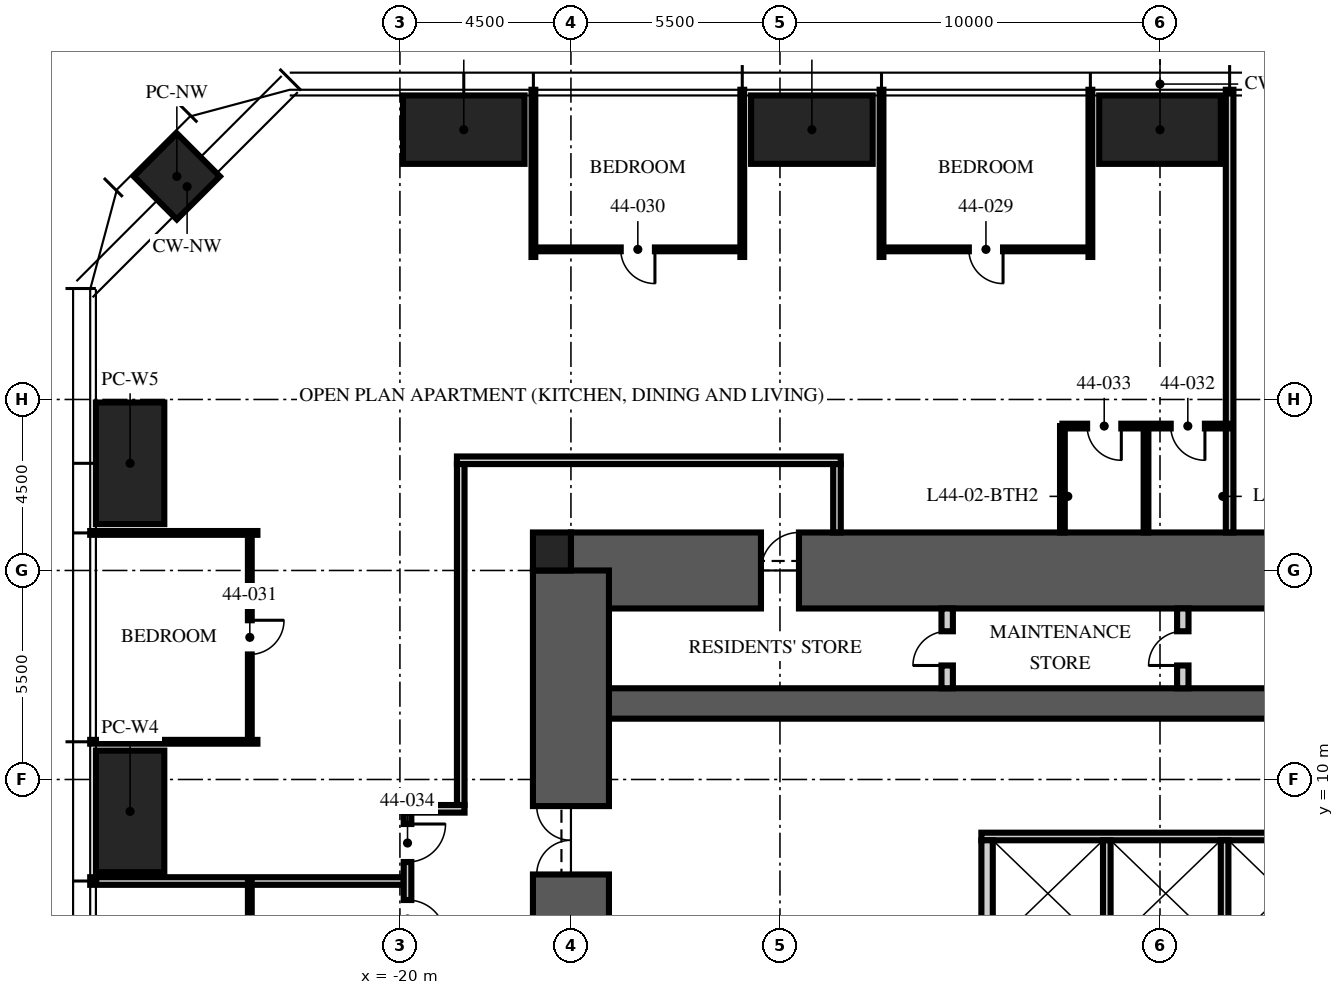
"""IFC4 building model, lengths in metres.
Left out: names, types, materials, properties, quantities, classifications, styles, units other than length and angle.
Written with IfcOpenShell. Run it as: python <this file> out.ifc"""

import sys

from ifc_helpers import new_model, si_unit, direction, frame, frame_2d, origin, origin_2d, place, context, subcontext, project, spatial, rectangle, hollow_rectangle, extrude, element, fill, save


model = new_model("IFC4")
c1 = context("Model", 3, precision=1e-05, world=origin(), true_north=direction((0.0, 1.0)))
c2 = subcontext(c1, "Body", "Model", "MODEL_VIEW")
j1 = project(units=[si_unit("LENGTHUNIT", "METRE"), si_unit("PLANEANGLEUNIT", "RADIAN")], contexts=[c1])
p1 = place(None, origin())
s1 = spatial("IfcSite", under=j1, at=p1, CompositionType="ELEMENT")
p2 = place(p1, origin())
s2 = spatial("IfcBuilding", under=s1, at=p2, CompositionType="ELEMENT")
p3 = place(p2, frame((0.0, 0.0, 174.75)))
s3 = spatial("IfcBuildingStorey", under=s2, at=p3, CompositionType="ELEMENT", Elevation=174.75)
p4 = place(p3, frame((-15.5, 15.5, -0.25), z_axis=(0.0, 0.0, 1.0), x_axis=(1.0, 0.0, 0.0)))
e1 = element("IfcWall", 1, at=p4, inside=s3, PredefinedType="SHEAR", context=c2, shape_type="SweptSolid", body=[
    extrude(rectangle(XDim=31.0, YDim=2.0, at=frame_2d((15.5, 0.0))), origin(), (0.0, 0.0, 1.0), 3.75),
])
p5 = place(p4, frame((5.0, 0.0, 0.25)))
e2 = element("IfcOpeningElement", 2, at=p5, cuts=e1, PredefinedType="OPENING", context=c2, shape_type="SweptSolid", body=[
    extrude(rectangle(XDim=1.0, YDim=2.1, at=frame_2d((0.5, 1.05))), frame((0.0, 1.01, 0.0), z_axis=(0.0, -1.0, 0.0), x_axis=(1.0, 0.0, 0.0)), (0.0, 0.0, 1.0), 2.02),
])
p6 = place(p3, frame((-15.5, 12.0, -0.25), z_axis=(0.0, 0.0, 1.0), x_axis=(1.0, 0.0, 0.0)))
e3 = element("IfcWall", 3, at=p6, inside=s3, PredefinedType="SHEAR", context=c2, shape_type="SweptSolid", body=[
    extrude(rectangle(XDim=31.0, YDim=0.8, at=frame_2d((15.5, 0.0))), origin(), (0.0, 0.0, 1.0), 3.75),
])
p7 = place(p3, frame((-15.5, -15.5, -0.25), z_axis=(0.0, 0.0, 1.0), x_axis=(0.0, 1.0, 0.0)))
e4 = element("IfcWall", 4, at=p7, inside=s3, PredefinedType="SHEAR", context=c2, shape_type="SweptSolid", body=[
    extrude(rectangle(XDim=31.0, YDim=2.0, at=frame_2d((15.5, 0.0))), origin(), (0.0, 0.0, 1.0), 3.75),
])
p8 = place(p7, frame((6.5, 0.0, 0.25)))
e5 = element("IfcOpeningElement", 5, at=p8, cuts=e4, PredefinedType="OPENING", context=c2, shape_type="SweptSolid", body=[
    extrude(rectangle(XDim=1.2, YDim=2.1, at=frame_2d((0.6, 1.05))), frame((0.0, 1.01, 0.0), z_axis=(0.0, -1.0, 0.0), x_axis=(1.0, 0.0, 0.0)), (0.0, 0.0, 1.0), 2.02),
])
p9 = place(p7, frame((23.0, 0.0, 0.25)))
e6 = element("IfcOpeningElement", 6, at=p9, cuts=e4, PredefinedType="OPENING", context=c2, shape_type="SweptSolid", body=[
    extrude(rectangle(XDim=1.8, YDim=2.1, at=frame_2d((0.9, 1.05))), frame((0.0, 1.01, 0.0), z_axis=(0.0, -1.0, 0.0), x_axis=(1.0, 0.0, 0.0)), (0.0, 0.0, 1.0), 2.02),
])
p10 = place(p3, frame((-16.0, 16.0, -0.25), z_axis=(0.0, 0.0, 1.0), x_axis=(1.0, 0.0, 0.0)))
e7 = element("IfcColumn", 7, at=p10, inside=s3, PredefinedType="COLUMN", context=c2, shape_type="SweptSolid", body=[
    extrude(rectangle(XDim=1.0, YDim=1.0, at=origin_2d()), origin(), (0.0, 0.0, 1.0), 3.75),
])
for number, where, z_axis, x_axis in (
    (8, (-18.32, 27.1, 0.0), (0.0, 0.0, 1.0), (1.0, 0.0, 0.0)),
    (9, (-9.16, 27.1, 0.0), (0.0, 0.0, 1.0), (1.0, 0.0, 0.0)),
    (10, (0.0, 27.1, 0.0), (0.0, 0.0, 1.0), (1.0, 0.0, 0.0)),
    (11, (-27.1, 9.16, 0.0), (0.0, 0.0, 1.0), (0.0, 1.0, 0.0)),
    (12, (-27.1, 18.32, 0.0), (0.0, 0.0, 1.0), (0.0, 1.0, 0.0)),
):
    element("IfcColumn", number, at=place(p3, frame(where, z_axis=z_axis, x_axis=x_axis)), inside=s3, PredefinedType="COLUMN", context=c2, shape_type="SweptSolid", body=[
        extrude(hollow_rectangle(XDim=3.2, YDim=1.8, WallThickness=0.2, at=origin_2d()), origin(), (0.0, 0.0, 1.0), 3.75),
    ])
p11 = place(p3, frame((-25.87, 25.87, 0.0), z_axis=(0.0, 0.0, 1.0), x_axis=(0.707106781187, 0.707106781187, 0.0)))
e13 = element("IfcColumn", 13, at=p11, inside=s3, PredefinedType="COLUMN", context=c2, shape_type="SweptSolid", body=[
    extrude(hollow_rectangle(XDim=1.6, YDim=1.6, WallThickness=0.1, at=origin_2d()), origin(), (0.0, 0.0, 1.0), 3.75),
])
p12 = place(p3, frame((-4.7, 8.5, 0.0), z_axis=(0.0, 0.0, 1.0), x_axis=(1.0, 0.0, 0.0)))
e14 = element("IfcWall", 14, at=p12, inside=s3, PredefinedType="PARTITIONING", context=c2, shape_type="SweptSolid", body=[
    extrude(rectangle(XDim=9.7, YDim=0.2, at=frame_2d((4.85, 0.0))), origin(), (0.0, 0.0, 1.0), 3.5),
])
p13 = place(p3, frame((-4.55, 5.6, 0.0), z_axis=(0.0, 0.0, 1.0), x_axis=(0.0, 1.0, 0.0)))
e15 = element("IfcWall", 15, at=p13, inside=s3, PredefinedType="PARTITIONING", context=c2, shape_type="SweptSolid", body=[
    extrude(rectangle(XDim=2.8, YDim=0.3, at=frame_2d((1.4, 0.0))), origin(), (0.0, 0.0, 1.0), 3.5),
])
for number, where, z_axis, x_axis in (
    (16, (-1.4, 5.6, 0.0), (0.0, 0.0, 1.0), (0.0, 1.0, 0.0)),
    (17, (1.7, 5.6, 0.0), (0.0, 0.0, 1.0), (0.0, 1.0, 0.0)),
):
    element("IfcWall", number, at=place(p3, frame(where, z_axis=z_axis, x_axis=x_axis)), inside=s3, PredefinedType="PARTITIONING", context=c2, shape_type="SweptSolid", body=[
        extrude(rectangle(XDim=2.8, YDim=0.2, at=frame_2d((1.4, 0.0))), origin(), (0.0, 0.0, 1.0), 3.5),
    ])
p14 = place(p3, frame((-5.6, 12.4, 0.0), z_axis=(0.0, 0.0, 1.0), x_axis=(0.0, 1.0, 0.0)))
e18 = element("IfcWall", 18, at=p14, inside=s3, PredefinedType="PARTITIONING", context=c2, shape_type="SweptSolid", body=[
    extrude(rectangle(XDim=2.1, YDim=0.3, at=frame_2d((1.05, 0.0))), origin(), (0.0, 0.0, 1.0), 3.5),
])
p15 = place(p14, frame((0.6, 0.0, 0.0)))
e19 = element("IfcOpeningElement", 19, at=p15, cuts=e18, PredefinedType="OPENING", context=c2, shape_type="SweptSolid", body=[
    extrude(rectangle(XDim=0.9, YDim=2.1, at=frame_2d((0.45, 1.05))), frame((0.0, 0.16, 0.0), z_axis=(0.0, -1.0, 0.0), x_axis=(1.0, 0.0, 0.0)), (0.0, 0.0, 1.0), 0.32),
])
p16 = place(p3, frame((0.6, 12.4, 0.0), z_axis=(0.0, 0.0, 1.0), x_axis=(0.0, 1.0, 0.0)))
e20 = element("IfcWall", 20, at=p16, inside=s3, PredefinedType="PARTITIONING", context=c2, shape_type="SweptSolid", body=[
    extrude(rectangle(XDim=2.1, YDim=0.3, at=frame_2d((1.05, 0.0))), origin(), (0.0, 0.0, 1.0), 3.5),
])
p17 = place(p16, frame((0.6, 0.0, 0.0)))
e21 = element("IfcOpeningElement", 21, at=p17, cuts=e20, PredefinedType="OPENING", context=c2, shape_type="SweptSolid", body=[
    extrude(rectangle(XDim=0.9, YDim=2.1, at=frame_2d((0.45, 1.05))), frame((0.0, 0.16, 0.0), z_axis=(0.0, -1.0, 0.0), x_axis=(1.0, 0.0, 0.0)), (0.0, 0.0, 1.0), 0.32),
])
p18 = place(p3, frame((-18.5, 18.4, 0.0), z_axis=(0.0, 0.0, 1.0), x_axis=(1.0, 0.0, 0.0)))
e22 = element("IfcWall", 22, at=p18, inside=s3, PredefinedType="PARTITIONING", context=c2, shape_type="SweptSolid", body=[
    extrude(rectangle(XDim=10.1, YDim=0.2, at=frame_2d((5.05, 0.0))), origin(), (0.0, 0.0, 1.0), 2.3),
])
p19 = place(p3, frame((-8.5, 18.3, 0.0), z_axis=(0.0, 0.0, 1.0), x_axis=(0.0, -1.0, 0.0)))
e23 = element("IfcWall", 23, at=p19, inside=s3, PredefinedType="PARTITIONING", context=c2, shape_type="SweptSolid", body=[
    extrude(rectangle(XDim=1.8, YDim=0.2, at=frame_2d((0.9, 0.0))), origin(), (0.0, 0.0, 1.0), 3.5),
])
p20 = place(p3, frame((1.832, 16.5, 0.0), z_axis=(0.0, 0.0, 1.0), x_axis=(0.0, 1.0, 0.0)))
e24 = element("IfcWall", 24, at=p20, inside=s3, PredefinedType="PARTITIONING", context=c2, shape_type="SweptSolid", body=[
    extrude(rectangle(XDim=11.65, YDim=0.2, at=frame_2d((5.825, 0.0))), origin(), (0.0, 0.0, 1.0), 2.81),
])
for number, where, z_axis, x_axis in (
    (25, (-1.832, 23.75, 0.0), (0.0, 0.0, 1.0), (0.0, 1.0, 0.0)),
    (26, (-7.328, 23.75, 0.0), (0.0, 0.0, 1.0), (0.0, 1.0, 0.0)),
    (27, (-10.992, 23.75, 0.0), (0.0, 0.0, 1.0), (0.0, 1.0, 0.0)),
    (28, (-16.488, 23.75, 0.0), (0.0, 0.0, 1.0), (0.0, 1.0, 0.0)),
    (29, (-23.75, 16.488, 0.0), (0.0, 0.0, 1.0), (-1.0, 0.0, 0.0)),
    (30, (-23.75, 10.992, 0.0), (0.0, 0.0, 1.0), (-1.0, 0.0, 0.0)),
):
    element("IfcWall", number, at=place(p3, frame(where, z_axis=z_axis, x_axis=x_axis)), inside=s3, PredefinedType="PARTITIONING", context=c2, shape_type="SweptSolid", body=[
        extrude(rectangle(XDim=4.4, YDim=0.1, at=frame_2d((2.2, 0.0))), origin(), (0.0, 0.0, 1.0), 2.81),
    ])
p21 = place(p3, frame((-19.9, 7.328, 0.0), z_axis=(0.0, 0.0, 1.0), x_axis=(-1.0, 0.0, 0.0)))
e31 = element("IfcWall", 31, at=p21, inside=s3, PredefinedType="PARTITIONING", context=c2, shape_type="SweptSolid", body=[
    extrude(rectangle(XDim=8.25, YDim=0.2, at=frame_2d((4.125, 0.0))), origin(), (0.0, 0.0, 1.0), 2.81),
])
p22 = place(p3, frame((-1.832, 23.95, 0.0), z_axis=(0.0, 0.0, 1.0), x_axis=(-1.0, 0.0, 0.0)))
e32 = element("IfcWall", 32, at=p22, inside=s3, PredefinedType="PARTITIONING", context=c2, shape_type="SweptSolid", body=[
    extrude(rectangle(XDim=5.496, YDim=0.1, at=frame_2d((2.748, 0.0))), origin(), (0.0, 0.0, 1.0), 2.81),
])
p23 = place(p22, frame((2.298, 0.0, 0.0)))
e33 = element("IfcOpeningElement", 33, at=p23, cuts=e32, PredefinedType="OPENING", context=c2, shape_type="SweptSolid", body=[
    extrude(rectangle(XDim=0.9, YDim=2.1, at=frame_2d((0.45, 1.05))), frame((0.0, 0.06, 0.0), z_axis=(0.0, -1.0, 0.0), x_axis=(1.0, 0.0, 0.0)), (0.0, 0.0, 1.0), 0.12),
])
p24 = place(p3, frame((-10.992, 23.95, 0.0), z_axis=(0.0, 0.0, 1.0), x_axis=(-1.0, 0.0, 0.0)))
e34 = element("IfcWall", 34, at=p24, inside=s3, PredefinedType="PARTITIONING", context=c2, shape_type="SweptSolid", body=[
    extrude(rectangle(XDim=5.496, YDim=0.1, at=frame_2d((2.748, 0.0))), origin(), (0.0, 0.0, 1.0), 2.81),
])
p25 = place(p24, frame((2.298, 0.0, 0.0)))
e35 = element("IfcOpeningElement", 35, at=p25, cuts=e34, PredefinedType="OPENING", context=c2, shape_type="SweptSolid", body=[
    extrude(rectangle(XDim=0.9, YDim=2.1, at=frame_2d((0.45, 1.05))), frame((0.0, 0.06, 0.0), z_axis=(0.0, -1.0, 0.0), x_axis=(1.0, 0.0, 0.0)), (0.0, 0.0, 1.0), 0.12),
])
p26 = place(p3, frame((-23.95, 16.488, 0.0), z_axis=(0.0, 0.0, 1.0), x_axis=(0.0, -1.0, 0.0)))
e36 = element("IfcWall", 36, at=p26, inside=s3, PredefinedType="PARTITIONING", context=c2, shape_type="SweptSolid", body=[
    extrude(rectangle(XDim=5.496, YDim=0.1, at=frame_2d((2.748, 0.0))), origin(), (0.0, 0.0, 1.0), 2.81),
])
p27 = place(p26, frame((2.298, 0.0, 0.0)))
e37 = element("IfcOpeningElement", 37, at=p27, cuts=e36, PredefinedType="OPENING", context=c2, shape_type="SweptSolid", body=[
    extrude(rectangle(XDim=0.9, YDim=2.1, at=frame_2d((0.45, 1.05))), frame((0.0, 0.06, 0.0), z_axis=(0.0, -1.0, 0.0), x_axis=(1.0, 0.0, 0.0)), (0.0, 0.0, 1.0), 0.12),
])
p28 = place(p3, frame((1.832, 19.3, 0.0), z_axis=(0.0, 0.0, 1.0), x_axis=(-1.0, 0.0, 0.0)))
e38 = element("IfcWall", 38, at=p28, inside=s3, PredefinedType="PARTITIONING", context=c2, shape_type="SweptSolid", body=[
    extrude(rectangle(XDim=4.4, YDim=0.125, at=frame_2d((2.2, 0.0))), origin(), (0.0, 0.0, 1.0), 2.7),
])
p29 = place(p28, frame((0.65, 0.0, 0.0)))
e39 = element("IfcOpeningElement", 39, at=p29, cuts=e38, PredefinedType="OPENING", context=c2, shape_type="SweptSolid", body=[
    extrude(rectangle(XDim=0.9, YDim=2.1, at=frame_2d((0.45, 1.05))), frame((0.0, 0.073, 0.0), z_axis=(0.0, -1.0, 0.0), x_axis=(1.0, 0.0, 0.0)), (0.0, 0.0, 1.0), 0.145),
])
p30 = place(p28, frame((2.85, 0.0, 0.0)))
e40 = element("IfcOpeningElement", 40, at=p30, cuts=e38, PredefinedType="OPENING", context=c2, shape_type="SweptSolid", body=[
    extrude(rectangle(XDim=0.9, YDim=2.1, at=frame_2d((0.45, 1.05))), frame((0.0, 0.073, 0.0), z_axis=(0.0, -1.0, 0.0), x_axis=(1.0, 0.0, 0.0)), (0.0, 0.0, 1.0), 0.145),
])
for number, where, z_axis, x_axis in (
    (41, (-0.368, 16.5, 0.0), (0.0, 0.0, 1.0), (0.0, 1.0, 0.0)),
    (42, (-2.568, 16.5, 0.0), (0.0, 0.0, 1.0), (0.0, 1.0, 0.0)),
):
    element("IfcWall", number, at=place(p3, frame(where, z_axis=z_axis, x_axis=x_axis)), inside=s3, PredefinedType="PARTITIONING", context=c2, shape_type="SweptSolid", body=[
        extrude(rectangle(XDim=2.8, YDim=0.125, at=frame_2d((1.4, 0.0))), origin(), (0.0, 0.0, 1.0), 3.5),
    ])
p31 = place(p3, frame((-23.95, 7.328, 0.0), z_axis=(0.0, 0.0, 1.0), x_axis=(0.0, -1.0, 0.0)))
e43 = element("IfcWall", 43, at=p31, inside=s3, PredefinedType="PARTITIONING", context=c2, shape_type="SweptSolid", body=[
    extrude(rectangle(XDim=5.496, YDim=0.1, at=frame_2d((2.748, 0.0))), origin(), (0.0, 0.0, 1.0), 2.81),
])
p32 = place(p31, frame((2.298, 0.0, 0.0)))
e44 = element("IfcOpeningElement", 44, at=p32, cuts=e43, PredefinedType="OPENING", context=c2, shape_type="SweptSolid", body=[
    extrude(rectangle(XDim=0.9, YDim=2.1, at=frame_2d((0.45, 1.05))), frame((0.0, 0.06, 0.0), z_axis=(0.0, -1.0, 0.0), x_axis=(1.0, 0.0, 0.0)), (0.0, 0.0, 1.0), 0.12),
])
p33 = place(p3, frame((-18.4, 18.3, 0.0), z_axis=(0.0, 0.0, 1.0), x_axis=(0.0, -1.0, 0.0)))
e45 = element("IfcWall", 45, at=p33, inside=s3, PredefinedType="PARTITIONING", context=c2, shape_type="SweptSolid", body=[
    extrude(rectangle(XDim=8.972, YDim=0.2, at=frame_2d((4.486, 0.0))), origin(), (0.0, 0.0, 1.0), 2.3),
])
p34 = place(p3, frame((-18.3, 9.228, 0.0), z_axis=(0.0, 0.0, 1.0), x_axis=(-1.0, 0.0, 0.0)))
e46 = element("IfcWall", 46, at=p34, inside=s3, PredefinedType="PARTITIONING", context=c2, shape_type="SweptSolid", body=[
    extrude(rectangle(XDim=1.6, YDim=0.2, at=frame_2d((0.8, 0.0))), origin(), (0.0, 0.0, 1.0), 2.7),
])
p35 = place(p3, frame((-19.8, 9.128, 0.0), z_axis=(0.0, 0.0, 1.0), x_axis=(0.0, -1.0, 0.0)))
e47 = element("IfcWall", 47, at=p35, inside=s3, PredefinedType="PARTITIONING", context=c2, shape_type="SweptSolid", body=[
    extrude(rectangle(XDim=3.6, YDim=0.2, at=frame_2d((1.8, 0.0))), origin(), (0.0, 0.0, 1.0), 2.7),
])
p36 = place(p35, frame((0.3, 0.0, 0.0)))
e48 = element("IfcOpeningElement", 48, at=p36, cuts=e47, PredefinedType="OPENING", context=c2, shape_type="SweptSolid", body=[
    extrude(rectangle(XDim=1.0, YDim=2.2, at=frame_2d((0.5, 1.1))), frame((0.0, 0.11, 0.0), z_axis=(0.0, -1.0, 0.0), x_axis=(1.0, 0.0, 0.0)), (0.0, 0.0, 1.0), 0.22),
])
p37 = place(p35, frame((2.3, 0.0, 0.0)))
e49 = element("IfcOpeningElement", 49, at=p37, cuts=e47, PredefinedType="OPENING", context=c2, shape_type="SweptSolid", body=[
    extrude(rectangle(XDim=1.0, YDim=2.2, at=frame_2d((0.5, 1.1))), frame((0.0, 0.11, 0.0), z_axis=(0.0, -1.0, 0.0), x_axis=(1.0, 0.0, 0.0)), (0.0, 0.0, 1.0), 0.22),
])
p38 = place(p9, origin())
e50 = element("IfcDoor", 50, at=p38, inside=s3, OperationType="DOUBLE_DOOR_SINGLE_SWING", PredefinedType="DOOR", context=c2, shape_type="SweptSolid", body=[
    extrude(rectangle(XDim=1.8, YDim=2.1, at=frame_2d((0.9, 1.05))), frame((0.0, 0.025, 0.0), z_axis=(0.0, -1.0, 0.0), x_axis=(1.0, 0.0, 0.0)), (0.0, 0.0, 1.0), 0.05),
])
fill(e6, e50)
p39 = place(p15, origin())
e51 = element("IfcDoor", 51, at=p39, inside=s3, OperationType="SINGLE_SWING_LEFT", PredefinedType="DOOR", context=c2, shape_type="SweptSolid", body=[
    extrude(rectangle(XDim=0.9, YDim=2.1, at=frame_2d((0.45, 1.05))), frame((0.0, 0.025, 0.0), z_axis=(0.0, -1.0, 0.0), x_axis=(1.0, 0.0, 0.0)), (0.0, 0.0, 1.0), 0.05),
])
fill(e19, e51)
p40 = place(p17, origin())
e52 = element("IfcDoor", 52, at=p40, inside=s3, OperationType="SINGLE_SWING_LEFT", PredefinedType="DOOR", context=c2, shape_type="SweptSolid", body=[
    extrude(rectangle(XDim=0.9, YDim=2.1, at=frame_2d((0.45, 1.05))), frame((0.0, 0.025, 0.0), z_axis=(0.0, -1.0, 0.0), x_axis=(1.0, 0.0, 0.0)), (0.0, 0.0, 1.0), 0.05),
])
fill(e21, e52)
p41 = place(p5, origin())
e53 = element("IfcDoor", 53, at=p41, inside=s3, OperationType="SINGLE_SWING_RIGHT", PredefinedType="DOOR", context=c2, shape_type="SweptSolid", body=[
    extrude(rectangle(XDim=1.0, YDim=2.1, at=frame_2d((0.5, 1.05))), frame((0.0, 0.025, 0.0), z_axis=(0.0, -1.0, 0.0), x_axis=(1.0, 0.0, 0.0)), (0.0, 0.0, 1.0), 0.05),
])
fill(e2, e53)
p42 = place(p23, origin())
e54 = element("IfcDoor", 54, at=p42, inside=s3, OperationType="SINGLE_SWING_LEFT", PredefinedType="DOOR", context=c2, shape_type="SweptSolid", body=[
    extrude(rectangle(XDim=0.9, YDim=2.1, at=frame_2d((0.45, 1.05))), frame((0.0, 0.025, 0.0), z_axis=(0.0, -1.0, 0.0), x_axis=(1.0, 0.0, 0.0)), (0.0, 0.0, 1.0), 0.05),
])
fill(e33, e54)
p43 = place(p25, origin())
e55 = element("IfcDoor", 55, at=p43, inside=s3, OperationType="SINGLE_SWING_LEFT", PredefinedType="DOOR", context=c2, shape_type="SweptSolid", body=[
    extrude(rectangle(XDim=0.9, YDim=2.1, at=frame_2d((0.45, 1.05))), frame((0.0, 0.025, 0.0), z_axis=(0.0, -1.0, 0.0), x_axis=(1.0, 0.0, 0.0)), (0.0, 0.0, 1.0), 0.05),
])
fill(e35, e55)
p44 = place(p27, origin())
e56 = element("IfcDoor", 56, at=p44, inside=s3, OperationType="SINGLE_SWING_LEFT", PredefinedType="DOOR", context=c2, shape_type="SweptSolid", body=[
    extrude(rectangle(XDim=0.9, YDim=2.1, at=frame_2d((0.45, 1.05))), frame((0.0, 0.025, 0.0), z_axis=(0.0, -1.0, 0.0), x_axis=(1.0, 0.0, 0.0)), (0.0, 0.0, 1.0), 0.05),
])
fill(e37, e56)
p45 = place(p29, origin())
e57 = element("IfcDoor", 57, at=p45, inside=s3, OperationType="SINGLE_SWING_LEFT", PredefinedType="DOOR", context=c2, shape_type="SweptSolid", body=[
    extrude(rectangle(XDim=0.9, YDim=2.1, at=frame_2d((0.45, 1.05))), frame((0.0, 0.025, 0.0), z_axis=(0.0, -1.0, 0.0), x_axis=(1.0, 0.0, 0.0)), (0.0, 0.0, 1.0), 0.05),
])
fill(e39, e57)
p46 = place(p30, origin())
e58 = element("IfcDoor", 58, at=p46, inside=s3, OperationType="SINGLE_SWING_LEFT", PredefinedType="DOOR", context=c2, shape_type="SweptSolid", body=[
    extrude(rectangle(XDim=0.9, YDim=2.1, at=frame_2d((0.45, 1.05))), frame((0.0, 0.025, 0.0), z_axis=(0.0, -1.0, 0.0), x_axis=(1.0, 0.0, 0.0)), (0.0, 0.0, 1.0), 0.05),
])
fill(e40, e58)
p47 = place(p36, origin())
e59 = element("IfcDoor", 59, at=p47, inside=s3, OperationType="SINGLE_SWING_LEFT", PredefinedType="DOOR", context=c2, shape_type="SweptSolid", body=[
    extrude(rectangle(XDim=1.0, YDim=2.2, at=frame_2d((0.5, 1.1))), frame((0.0, 0.025, 0.0), z_axis=(0.0, -1.0, 0.0), x_axis=(1.0, 0.0, 0.0)), (0.0, 0.0, 1.0), 0.05),
])
fill(e48, e59)
p48 = place(p37, origin())
e60 = element("IfcDoor", 60, at=p48, inside=s3, OperationType="SINGLE_SWING_RIGHT", PredefinedType="DOOR", context=c2, shape_type="SweptSolid", body=[
    extrude(rectangle(XDim=1.0, YDim=2.2, at=frame_2d((0.5, 1.1))), frame((0.0, 0.025, 0.0), z_axis=(0.0, -1.0, 0.0), x_axis=(1.0, 0.0, 0.0)), (0.0, 0.0, 1.0), 0.05),
])
fill(e49, e60)
save(model, sys.argv[1])
